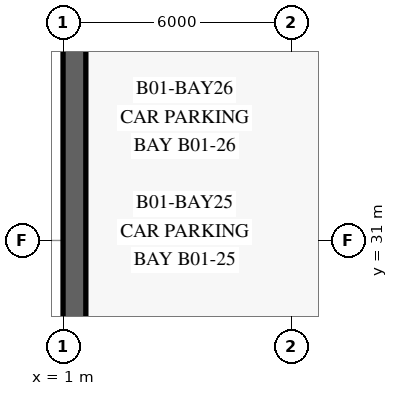
"""IFC4 building model, lengths in metres.
Left out: names, types, materials, properties, quantities, classifications, styles, units other than length and angle.
Written with IfcOpenShell. Run it as: python <this file> out.ifc"""

import sys

from ifc_helpers import new_model, si_unit, direction, frame, frame_2d, origin, origin_2d, place, context, subcontext, project, spatial, rectangle, i_section, extrude, element, save


model = new_model("IFC4")
c1 = context("Model", 3, precision=1e-05, world=origin(), true_north=direction((0.0, 1.0)))
c2 = subcontext(c1, "Body", "Model", "MODEL_VIEW")
j1 = project(units=[si_unit("LENGTHUNIT", "METRE"), si_unit("PLANEANGLEUNIT", "RADIAN")], contexts=[c1])
p1 = place(None, origin())
s1 = spatial("IfcSite", under=j1, at=p1, CompositionType="ELEMENT")
p2 = place(p1, origin())
s2 = spatial("IfcBuilding", under=s1, at=p2, CompositionType="ELEMENT")
p3 = place(p2, frame((0.0, 0.0, -4.2)))
s3 = spatial("IfcBuildingStorey", under=s2, at=p3, CompositionType="ELEMENT", Elevation=-4.2)
p4 = place(p3, frame((1.3, 48.4, 0.0), z_axis=(0.0, 0.0, 1.0), x_axis=(0.0, -1.0, 0.0)))
e1 = element("IfcWall", 1, at=p4, inside=s3, PredefinedType="USERDEFINED", context=c2, shape_type="SweptSolid", body=[
    extrude(rectangle(XDim=46.8, YDim=0.6, at=frame_2d((23.4, 0.0))), origin(), (0.0, 0.0, 1.0), 3.88),
])
p5 = place(p3, frame((6.8, 28.7, 0.0), z_axis=(0.0, 0.0, 1.0), x_axis=(1.0, 0.0, 0.0)))
e2 = element("IfcColumn", 2, at=p5, inside=s3, PredefinedType="COLUMN", context=c2, shape_type="SweptSolid", body=[
    extrude(i_section(OverallWidth=0.303, OverallDepth=0.814, WebThickness=0.021, FlangeThickness=0.04, at=origin_2d()), origin(), (0.0, 0.0, 1.0), 4.2),
])
save(model, sys.argv[1])
